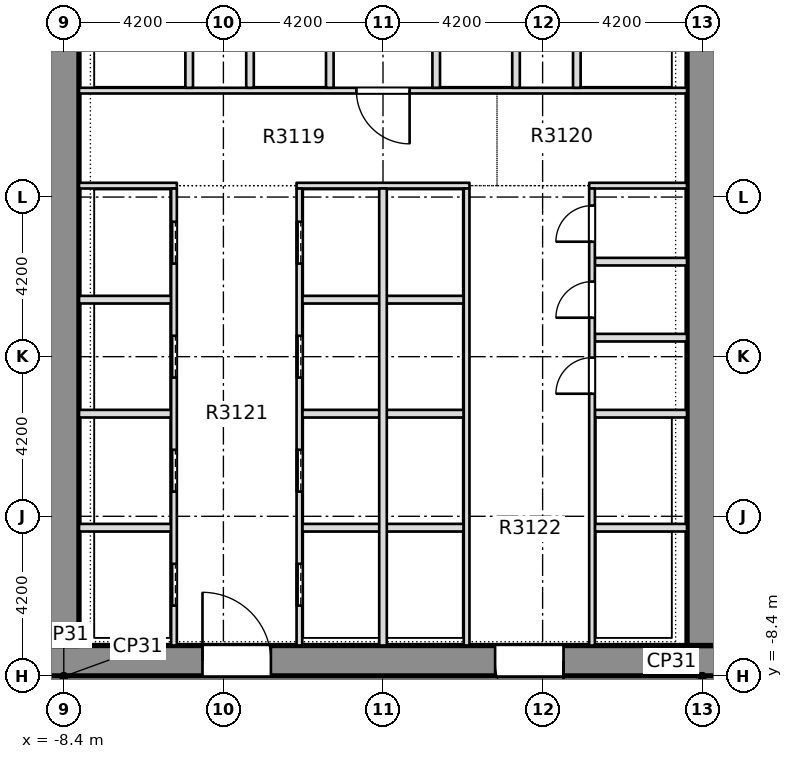
"""IFC4 building model, lengths in metres.
Left out: names, types, materials, properties, quantities, classifications, styles, units other than length and angle.
Written with IfcOpenShell. Run it as: python <this file> out.ifc"""

import sys

from ifc_helpers import new_model, si_unit, direction, frame, frame_2d, origin, place, context, subcontext, project, spatial, rectangle, extrude, element, fill, save


model = new_model("IFC4")
c1 = context("Model", 3, precision=1e-05, world=origin(), true_north=direction((0.0, 1.0)))
c2 = subcontext(c1, "Body", "Model", "MODEL_VIEW")
j1 = project(units=[si_unit("LENGTHUNIT", "METRE"), si_unit("PLANEANGLEUNIT", "RADIAN")], contexts=[c1])
p1 = place(None, origin())
s1 = spatial("IfcSite", under=j1, at=p1, CompositionType="ELEMENT")
p2 = place(p1, origin())
s2 = spatial("IfcBuilding", under=s1, at=p2, CompositionType="ELEMENT")
p3 = place(p2, frame((0.0, 0.0, 121.8)))
s3 = spatial("IfcBuildingStorey", under=s2, at=p3, CompositionType="ELEMENT", Elevation=121.8)
p4 = place(p3, frame((-11.8, -8.0, 0.0), z_axis=(0.0, 0.0, 1.0), x_axis=(1.0, 0.0, 0.0)))
e1 = element("IfcWall", 1, at=p4, inside=s3, PredefinedType="SHEAR", context=c2, shape_type="SweptSolid", body=[
    extrude(rectangle(XDim=23.6, YDim=0.8, at=frame_2d((11.8, 0.0))), origin(), (0.0, 0.0, 1.0), 6.1),
])
p5 = place(p4, frame((7.05, 0.0, 0.0)))
e2 = element("IfcOpeningElement", 2, at=p5, cuts=e1, PredefinedType="OPENING", context=c2, shape_type="SweptSolid", body=[
    extrude(rectangle(XDim=1.8, YDim=2.1, at=frame_2d((0.9, 1.05))), frame((0.0, 0.41, 0.0), z_axis=(0.0, -1.0, 0.0), x_axis=(1.0, 0.0, 0.0)), (0.0, 0.0, 1.0), 0.82),
])
p6 = place(p4, frame((14.75, 0.0, 0.0)))
e3 = element("IfcOpeningElement", 3, at=p6, cuts=e1, PredefinedType="OPENING", context=c2, shape_type="SweptSolid", body=[
    extrude(rectangle(XDim=1.8, YDim=2.1, at=frame_2d((0.9, 1.05))), frame((0.0, 0.41, 0.0), z_axis=(0.0, -1.0, 0.0), x_axis=(1.0, 0.0, 0.0)), (0.0, 0.0, 1.0), 0.82),
])
p7 = place(p3, frame((-8.4, -7.6, 0.0), z_axis=(0.0, 0.0, 1.0), x_axis=(0.0, 1.0, 0.0)))
e4 = element("IfcWall", 4, at=p7, inside=s3, PredefinedType="SHEAR", context=c2, shape_type="SweptSolid", body=[
    extrude(rectangle(XDim=28.55, YDim=0.8, at=frame_2d((14.275, 0.0))), origin(), (0.0, 0.0, 1.0), 6.1),
])
p8 = place(p7, frame((19.2, 0.0, 0.0)))
e5 = element("IfcOpeningElement", 5, at=p8, cuts=e4, PredefinedType="OPENING", context=c2, shape_type="SweptSolid", body=[
    extrude(rectangle(XDim=1.2, YDim=2.1, at=frame_2d((0.6, 1.05))), frame((0.0, 0.41, 0.0), z_axis=(0.0, -1.0, 0.0), x_axis=(1.0, 0.0, 0.0)), (0.0, 0.0, 1.0), 0.82),
])
p9 = place(p3, frame((8.4, -7.6, 0.0), z_axis=(0.0, 0.0, 1.0), x_axis=(0.0, 1.0, 0.0)))
e6 = element("IfcWall", 6, at=p9, inside=s3, PredefinedType="SHEAR", context=c2, shape_type="SweptSolid", body=[
    extrude(rectangle(XDim=28.55, YDim=0.8, at=frame_2d((14.275, 0.0))), origin(), (0.0, 0.0, 1.0), 6.1),
])
p10 = place(p9, frame((19.2, 0.0, 0.0)))
e7 = element("IfcOpeningElement", 7, at=p10, cuts=e6, PredefinedType="OPENING", context=c2, shape_type="SweptSolid", body=[
    extrude(rectangle(XDim=1.2, YDim=2.1, at=frame_2d((0.6, 1.05))), frame((0.0, 0.41, 0.0), z_axis=(0.0, -1.0, 0.0), x_axis=(1.0, 0.0, 0.0)), (0.0, 0.0, 1.0), 0.82),
])
p11 = place(p3, frame((-7.999, -4.5, 0.0), z_axis=(0.0, 0.0, 1.0), x_axis=(1.0, 0.0, 0.0)))
e8 = element("IfcWall", 8, at=p11, inside=s3, PredefinedType="PARTITIONING", context=c2, shape_type="SweptSolid", body=[
    extrude(rectangle(XDim=2.424, YDim=0.2, at=frame_2d((1.212, 0.0))), origin(), (0.0, 0.0, 1.0), 6.1),
])
p12 = place(p3, frame((-2.125, -4.5, 0.0), z_axis=(0.0, 0.0, 1.0), x_axis=(1.0, 0.0, 0.0)))
e9 = element("IfcWall", 9, at=p12, inside=s3, PredefinedType="PARTITIONING", context=c2, shape_type="SweptSolid", body=[
    extrude(rectangle(XDim=4.25, YDim=0.2, at=frame_2d((2.125, 0.0))), origin(), (0.0, 0.0, 1.0), 6.1),
])
for number, where, z_axis, x_axis in (
    (10, (5.575, -4.5, 0.0), (0.0, 0.0, 1.0), (1.0, 0.0, 0.0)),
    (11, (-7.999, -1.5, 0.0), (0.0, 0.0, 1.0), (1.0, 0.0, 0.0)),
):
    element("IfcWall", number, at=place(p3, frame(where, z_axis=z_axis, x_axis=x_axis)), inside=s3, PredefinedType="PARTITIONING", context=c2, shape_type="SweptSolid", body=[
        extrude(rectangle(XDim=2.424, YDim=0.2, at=frame_2d((1.212, 0.0))), origin(), (0.0, 0.0, 1.0), 6.1),
    ])
p13 = place(p3, frame((-2.125, -1.5, 0.0), z_axis=(0.0, 0.0, 1.0), x_axis=(1.0, 0.0, 0.0)))
e12 = element("IfcWall", 12, at=p13, inside=s3, PredefinedType="PARTITIONING", context=c2, shape_type="SweptSolid", body=[
    extrude(rectangle(XDim=4.25, YDim=0.2, at=frame_2d((2.125, 0.0))), origin(), (0.0, 0.0, 1.0), 6.1),
])
for number, where, z_axis, x_axis in (
    (13, (5.575, -1.5, 0.0), (0.0, 0.0, 1.0), (1.0, 0.0, 0.0)),
    (14, (5.575, 0.5, 0.0), (0.0, 0.0, 1.0), (1.0, 0.0, 0.0)),
    (15, (-7.999, 1.5, 0.0), (0.0, 0.0, 1.0), (1.0, 0.0, 0.0)),
):
    element("IfcWall", number, at=place(p3, frame(where, z_axis=z_axis, x_axis=x_axis)), inside=s3, PredefinedType="PARTITIONING", context=c2, shape_type="SweptSolid", body=[
        extrude(rectangle(XDim=2.424, YDim=0.2, at=frame_2d((1.212, 0.0))), origin(), (0.0, 0.0, 1.0), 6.1),
    ])
p14 = place(p3, frame((-2.125, 1.5, 0.0), z_axis=(0.0, 0.0, 1.0), x_axis=(1.0, 0.0, 0.0)))
e16 = element("IfcWall", 16, at=p14, inside=s3, PredefinedType="PARTITIONING", context=c2, shape_type="SweptSolid", body=[
    extrude(rectangle(XDim=4.25, YDim=0.2, at=frame_2d((2.125, 0.0))), origin(), (0.0, 0.0, 1.0), 6.1),
])
p15 = place(p3, frame((5.575, 2.5, 0.0), z_axis=(0.0, 0.0, 1.0), x_axis=(1.0, 0.0, 0.0)))
e17 = element("IfcWall", 17, at=p15, inside=s3, PredefinedType="PARTITIONING", context=c2, shape_type="SweptSolid", body=[
    extrude(rectangle(XDim=2.424, YDim=0.2, at=frame_2d((1.212, 0.0))), origin(), (0.0, 0.0, 1.0), 6.1),
])
p16 = place(p3, frame((-7.999, 4.5, 0.0), z_axis=(0.0, 0.0, 1.0), x_axis=(1.0, 0.0, 0.0)))
e18 = element("IfcWall", 18, at=p16, inside=s3, PredefinedType="PARTITIONING", context=c2, shape_type="SweptSolid", body=[
    extrude(rectangle(XDim=2.574, YDim=0.15, at=frame_2d((1.287, 0.0))), origin(), (0.0, 0.0, 1.0), 6.1),
])
p17 = place(p3, frame((-2.275, 4.5, 0.0), z_axis=(0.0, 0.0, 1.0), x_axis=(1.0, 0.0, 0.0)))
e19 = element("IfcWall", 19, at=p17, inside=s3, PredefinedType="PARTITIONING", context=c2, shape_type="SweptSolid", body=[
    extrude(rectangle(XDim=4.55, YDim=0.15, at=frame_2d((2.275, 0.0))), origin(), (0.0, 0.0, 1.0), 6.1),
])
p18 = place(p3, frame((5.425, 4.5, 0.0), z_axis=(0.0, 0.0, 1.0), x_axis=(1.0, 0.0, 0.0)))
e20 = element("IfcWall", 20, at=p18, inside=s3, PredefinedType="PARTITIONING", context=c2, shape_type="SweptSolid", body=[
    extrude(rectangle(XDim=2.574, YDim=0.15, at=frame_2d((1.287, 0.0))), origin(), (0.0, 0.0, 1.0), 6.1),
])
p19 = place(p3, frame((-7.999, 7.0, 0.0), z_axis=(0.0, 0.0, 1.0), x_axis=(1.0, 0.0, 0.0)))
e21 = element("IfcWall", 21, at=p19, inside=s3, PredefinedType="PARTITIONING", context=c2, shape_type="SweptSolid", body=[
    extrude(rectangle(XDim=15.998, YDim=0.15, at=frame_2d((7.999, 0.0))), origin(), (0.0, 0.0, 1.0), 6.1),
])
p20 = place(p19, frame((7.299, 0.0, 0.0)))
e22 = element("IfcOpeningElement", 22, at=p20, cuts=e21, PredefinedType="OPENING", context=c2, shape_type="SweptSolid", body=[
    extrude(rectangle(XDim=1.4, YDim=2.1, at=frame_2d((0.7, 1.05))), frame((0.0, 0.085, 0.0), z_axis=(0.0, -1.0, 0.0), x_axis=(1.0, 0.0, 0.0)), (0.0, 0.0, 1.0), 0.17),
])
p21 = place(p3, frame((-5.5, -7.599, 0.0), z_axis=(0.0, 0.0, 1.0), x_axis=(0.0, 1.0, 0.0)))
e23 = element("IfcWall", 23, at=p21, inside=s3, PredefinedType="PARTITIONING", context=c2, shape_type="SweptSolid", body=[
    extrude(rectangle(XDim=12.024, YDim=0.15, at=frame_2d((6.012, 0.0))), origin(), (0.0, 0.0, 1.0), 6.1),
])
p22 = place(p21, frame((1.049, 0.0, 0.0)))
e24 = element("IfcOpeningElement", 24, at=p22, cuts=e23, PredefinedType="OPENING", context=c2, shape_type="SweptSolid", body=[
    extrude(rectangle(XDim=1.1, YDim=2.1, at=frame_2d((0.55, 1.05))), frame((0.0, 0.085, 0.0), z_axis=(0.0, -1.0, 0.0), x_axis=(1.0, 0.0, 0.0)), (0.0, 0.0, 1.0), 0.17),
])
p23 = place(p21, frame((4.049, 0.0, 0.0)))
e25 = element("IfcOpeningElement", 25, at=p23, cuts=e23, PredefinedType="OPENING", context=c2, shape_type="SweptSolid", body=[
    extrude(rectangle(XDim=1.1, YDim=2.1, at=frame_2d((0.55, 1.05))), frame((0.0, 0.085, 0.0), z_axis=(0.0, -1.0, 0.0), x_axis=(1.0, 0.0, 0.0)), (0.0, 0.0, 1.0), 0.17),
])
p24 = place(p21, frame((7.049, 0.0, 0.0)))
e26 = element("IfcOpeningElement", 26, at=p24, cuts=e23, PredefinedType="OPENING", context=c2, shape_type="SweptSolid", body=[
    extrude(rectangle(XDim=1.1, YDim=2.1, at=frame_2d((0.55, 1.05))), frame((0.0, 0.085, 0.0), z_axis=(0.0, -1.0, 0.0), x_axis=(1.0, 0.0, 0.0)), (0.0, 0.0, 1.0), 0.17),
])
p25 = place(p21, frame((10.049, 0.0, 0.0)))
e27 = element("IfcOpeningElement", 27, at=p25, cuts=e23, PredefinedType="OPENING", context=c2, shape_type="SweptSolid", body=[
    extrude(rectangle(XDim=1.1, YDim=2.1, at=frame_2d((0.55, 1.05))), frame((0.0, 0.085, 0.0), z_axis=(0.0, -1.0, 0.0), x_axis=(1.0, 0.0, 0.0)), (0.0, 0.0, 1.0), 0.17),
])
p26 = place(p3, frame((-5.1, 7.075, 0.0), z_axis=(0.0, 0.0, 1.0), x_axis=(0.0, 1.0, 0.0)))
e28 = element("IfcWall", 28, at=p26, inside=s3, PredefinedType="PARTITIONING", context=c2, shape_type="SweptSolid", body=[
    extrude(rectangle(XDim=2.725, YDim=0.2, at=frame_2d((1.363, 0.0))), origin(), (0.0, 0.0, 1.0), 6.1),
])
p27 = place(p3, frame((-3.5, 7.075, 0.0), z_axis=(0.0, 0.0, 1.0), x_axis=(0.0, 1.0, 0.0)))
e29 = element("IfcWall", 29, at=p27, inside=s3, PredefinedType="PARTITIONING", context=c2, shape_type="SweptSolid", body=[
    extrude(rectangle(XDim=2.85, YDim=0.2, at=frame_2d((1.425, 0.0))), origin(), (0.0, 0.0, 1.0), 6.1),
])
p28 = place(p3, frame((-2.2, -7.599, 0.0), z_axis=(0.0, 0.0, 1.0), x_axis=(0.0, 1.0, 0.0)))
e30 = element("IfcWall", 30, at=p28, inside=s3, PredefinedType="PARTITIONING", context=c2, shape_type="SweptSolid", body=[
    extrude(rectangle(XDim=12.024, YDim=0.15, at=frame_2d((6.012, 0.0))), origin(), (0.0, 0.0, 1.0), 6.1),
])
p29 = place(p28, frame((1.049, 0.0, 0.0)))
e31 = element("IfcOpeningElement", 31, at=p29, cuts=e30, PredefinedType="OPENING", context=c2, shape_type="SweptSolid", body=[
    extrude(rectangle(XDim=1.1, YDim=2.1, at=frame_2d((0.55, 1.05))), frame((0.0, 0.085, 0.0), z_axis=(0.0, -1.0, 0.0), x_axis=(1.0, 0.0, 0.0)), (0.0, 0.0, 1.0), 0.17),
])
p30 = place(p28, frame((4.049, 0.0, 0.0)))
e32 = element("IfcOpeningElement", 32, at=p30, cuts=e30, PredefinedType="OPENING", context=c2, shape_type="SweptSolid", body=[
    extrude(rectangle(XDim=1.1, YDim=2.1, at=frame_2d((0.55, 1.05))), frame((0.0, 0.085, 0.0), z_axis=(0.0, -1.0, 0.0), x_axis=(1.0, 0.0, 0.0)), (0.0, 0.0, 1.0), 0.17),
])
p31 = place(p28, frame((7.049, 0.0, 0.0)))
e33 = element("IfcOpeningElement", 33, at=p31, cuts=e30, PredefinedType="OPENING", context=c2, shape_type="SweptSolid", body=[
    extrude(rectangle(XDim=1.1, YDim=2.1, at=frame_2d((0.55, 1.05))), frame((0.0, 0.085, 0.0), z_axis=(0.0, -1.0, 0.0), x_axis=(1.0, 0.0, 0.0)), (0.0, 0.0, 1.0), 0.17),
])
p32 = place(p28, frame((10.049, 0.0, 0.0)))
e34 = element("IfcOpeningElement", 34, at=p32, cuts=e30, PredefinedType="OPENING", context=c2, shape_type="SweptSolid", body=[
    extrude(rectangle(XDim=1.1, YDim=2.1, at=frame_2d((0.55, 1.05))), frame((0.0, 0.085, 0.0), z_axis=(0.0, -1.0, 0.0), x_axis=(1.0, 0.0, 0.0)), (0.0, 0.0, 1.0), 0.17),
])
p33 = place(p3, frame((-1.4, 7.075, 0.0), z_axis=(0.0, 0.0, 1.0), x_axis=(0.0, 1.0, 0.0)))
e35 = element("IfcWall", 35, at=p33, inside=s3, PredefinedType="PARTITIONING", context=c2, shape_type="SweptSolid", body=[
    extrude(rectangle(XDim=2.85, YDim=0.2, at=frame_2d((1.425, 0.0))), origin(), (0.0, 0.0, 1.0), 6.1),
])
p34 = place(p3, frame((0.0, -7.599, 0.0), z_axis=(0.0, 0.0, 1.0), x_axis=(0.0, 1.0, 0.0)))
e36 = element("IfcWall", 36, at=p34, inside=s3, PredefinedType="PARTITIONING", context=c2, shape_type="SweptSolid", body=[
    extrude(rectangle(XDim=12.024, YDim=0.2, at=frame_2d((6.012, 0.0))), origin(), (0.0, 0.0, 1.0), 6.1),
])
p35 = place(p3, frame((1.4, 7.075, 0.0), z_axis=(0.0, 0.0, 1.0), x_axis=(0.0, 1.0, 0.0)))
e37 = element("IfcWall", 37, at=p35, inside=s3, PredefinedType="PARTITIONING", context=c2, shape_type="SweptSolid", body=[
    extrude(rectangle(XDim=2.85, YDim=0.2, at=frame_2d((1.425, 0.0))), origin(), (0.0, 0.0, 1.0), 6.1),
])
p36 = place(p3, frame((2.2, -7.599, 0.0), z_axis=(0.0, 0.0, 1.0), x_axis=(0.0, 1.0, 0.0)))
e38 = element("IfcWall", 38, at=p36, inside=s3, PredefinedType="PARTITIONING", context=c2, shape_type="SweptSolid", body=[
    extrude(rectangle(XDim=12.024, YDim=0.15, at=frame_2d((6.012, 0.0))), origin(), (0.0, 0.0, 1.0), 6.1),
])
p37 = place(p3, frame((3.5, 7.075, 0.0), z_axis=(0.0, 0.0, 1.0), x_axis=(0.0, 1.0, 0.0)))
e39 = element("IfcWall", 39, at=p37, inside=s3, PredefinedType="PARTITIONING", context=c2, shape_type="SweptSolid", body=[
    extrude(rectangle(XDim=2.85, YDim=0.2, at=frame_2d((1.425, 0.0))), origin(), (0.0, 0.0, 1.0), 6.1),
])
p38 = place(p3, frame((5.1, 7.075, 0.0), z_axis=(0.0, 0.0, 1.0), x_axis=(0.0, 1.0, 0.0)))
e40 = element("IfcWall", 40, at=p38, inside=s3, PredefinedType="PARTITIONING", context=c2, shape_type="SweptSolid", body=[
    extrude(rectangle(XDim=2.725, YDim=0.2, at=frame_2d((1.363, 0.0))), origin(), (0.0, 0.0, 1.0), 6.1),
])
p39 = place(p3, frame((5.5, -7.599, 0.0), z_axis=(0.0, 0.0, 1.0), x_axis=(0.0, 1.0, 0.0)))
e41 = element("IfcWall", 41, at=p39, inside=s3, PredefinedType="PARTITIONING", context=c2, shape_type="SweptSolid", body=[
    extrude(rectangle(XDim=12.024, YDim=0.15, at=frame_2d((6.012, 0.0))), origin(), (0.0, 0.0, 1.0), 6.1),
])
p40 = place(p39, frame((6.624, 0.0, 0.0)))
e42 = element("IfcOpeningElement", 42, at=p40, cuts=e41, PredefinedType="OPENING", context=c2, shape_type="SweptSolid", body=[
    extrude(rectangle(XDim=0.95, YDim=2.1, at=frame_2d((0.475, 1.05))), frame((0.0, 0.085, 0.0), z_axis=(0.0, -1.0, 0.0), x_axis=(1.0, 0.0, 0.0)), (0.0, 0.0, 1.0), 0.17),
])
p41 = place(p39, frame((8.624, 0.0, 0.0)))
e43 = element("IfcOpeningElement", 43, at=p41, cuts=e41, PredefinedType="OPENING", context=c2, shape_type="SweptSolid", body=[
    extrude(rectangle(XDim=0.95, YDim=2.1, at=frame_2d((0.475, 1.05))), frame((0.0, 0.085, 0.0), z_axis=(0.0, -1.0, 0.0), x_axis=(1.0, 0.0, 0.0)), (0.0, 0.0, 1.0), 0.17),
])
p42 = place(p39, frame((10.624, 0.0, 0.0)))
e44 = element("IfcOpeningElement", 44, at=p42, cuts=e41, PredefinedType="OPENING", context=c2, shape_type="SweptSolid", body=[
    extrude(rectangle(XDim=0.95, YDim=2.1, at=frame_2d((0.475, 1.05))), frame((0.0, 0.085, 0.0), z_axis=(0.0, -1.0, 0.0), x_axis=(1.0, 0.0, 0.0)), (0.0, 0.0, 1.0), 0.17),
])
p43 = place(p22, origin())
e45 = element("IfcDoor", 45, at=p43, inside=s3, OperationType="SLIDING_TO_LEFT", PredefinedType="DOOR", context=c2, shape_type="SweptSolid", body=[
    extrude(rectangle(XDim=1.1, YDim=2.1, at=frame_2d((0.55, 1.05))), frame((0.0, 0.025, 0.0), z_axis=(0.0, -1.0, 0.0), x_axis=(1.0, 0.0, 0.0)), (0.0, 0.0, 1.0), 0.05),
])
fill(e24, e45)
p44 = place(p23, origin())
e46 = element("IfcDoor", 46, at=p44, inside=s3, OperationType="SLIDING_TO_LEFT", PredefinedType="DOOR", context=c2, shape_type="SweptSolid", body=[
    extrude(rectangle(XDim=1.1, YDim=2.1, at=frame_2d((0.55, 1.05))), frame((0.0, 0.025, 0.0), z_axis=(0.0, -1.0, 0.0), x_axis=(1.0, 0.0, 0.0)), (0.0, 0.0, 1.0), 0.05),
])
fill(e25, e46)
p45 = place(p24, origin())
e47 = element("IfcDoor", 47, at=p45, inside=s3, OperationType="SLIDING_TO_LEFT", PredefinedType="DOOR", context=c2, shape_type="SweptSolid", body=[
    extrude(rectangle(XDim=1.1, YDim=2.1, at=frame_2d((0.55, 1.05))), frame((0.0, 0.025, 0.0), z_axis=(0.0, -1.0, 0.0), x_axis=(1.0, 0.0, 0.0)), (0.0, 0.0, 1.0), 0.05),
])
fill(e26, e47)
p46 = place(p25, origin())
e48 = element("IfcDoor", 48, at=p46, inside=s3, OperationType="SLIDING_TO_LEFT", PredefinedType="DOOR", context=c2, shape_type="SweptSolid", body=[
    extrude(rectangle(XDim=1.1, YDim=2.1, at=frame_2d((0.55, 1.05))), frame((0.0, 0.025, 0.0), z_axis=(0.0, -1.0, 0.0), x_axis=(1.0, 0.0, 0.0)), (0.0, 0.0, 1.0), 0.05),
])
fill(e27, e48)
p47 = place(p29, origin())
e49 = element("IfcDoor", 49, at=p47, inside=s3, OperationType="SLIDING_TO_LEFT", PredefinedType="DOOR", context=c2, shape_type="SweptSolid", body=[
    extrude(rectangle(XDim=1.1, YDim=2.1, at=frame_2d((0.55, 1.05))), frame((0.0, 0.025, 0.0), z_axis=(0.0, -1.0, 0.0), x_axis=(1.0, 0.0, 0.0)), (0.0, 0.0, 1.0), 0.05),
])
fill(e31, e49)
p48 = place(p30, origin())
e50 = element("IfcDoor", 50, at=p48, inside=s3, OperationType="SLIDING_TO_LEFT", PredefinedType="DOOR", context=c2, shape_type="SweptSolid", body=[
    extrude(rectangle(XDim=1.1, YDim=2.1, at=frame_2d((0.55, 1.05))), frame((0.0, 0.025, 0.0), z_axis=(0.0, -1.0, 0.0), x_axis=(1.0, 0.0, 0.0)), (0.0, 0.0, 1.0), 0.05),
])
fill(e32, e50)
p49 = place(p31, origin())
e51 = element("IfcDoor", 51, at=p49, inside=s3, OperationType="SLIDING_TO_LEFT", PredefinedType="DOOR", context=c2, shape_type="SweptSolid", body=[
    extrude(rectangle(XDim=1.1, YDim=2.1, at=frame_2d((0.55, 1.05))), frame((0.0, 0.025, 0.0), z_axis=(0.0, -1.0, 0.0), x_axis=(1.0, 0.0, 0.0)), (0.0, 0.0, 1.0), 0.05),
])
fill(e33, e51)
p50 = place(p32, origin())
e52 = element("IfcDoor", 52, at=p50, inside=s3, OperationType="SLIDING_TO_LEFT", PredefinedType="DOOR", context=c2, shape_type="SweptSolid", body=[
    extrude(rectangle(XDim=1.1, YDim=2.1, at=frame_2d((0.55, 1.05))), frame((0.0, 0.025, 0.0), z_axis=(0.0, -1.0, 0.0), x_axis=(1.0, 0.0, 0.0)), (0.0, 0.0, 1.0), 0.05),
])
fill(e34, e52)
p51 = place(p40, origin())
e53 = element("IfcDoor", 53, at=p51, inside=s3, OperationType="SINGLE_SWING_RIGHT", PredefinedType="DOOR", context=c2, shape_type="SweptSolid", body=[
    extrude(rectangle(XDim=0.95, YDim=2.1, at=frame_2d((0.475, 1.05))), frame((0.0, 0.025, 0.0), z_axis=(0.0, -1.0, 0.0), x_axis=(1.0, 0.0, 0.0)), (0.0, 0.0, 1.0), 0.05),
])
fill(e42, e53)
p52 = place(p41, origin())
e54 = element("IfcDoor", 54, at=p52, inside=s3, OperationType="SINGLE_SWING_LEFT", PredefinedType="DOOR", context=c2, shape_type="SweptSolid", body=[
    extrude(rectangle(XDim=0.95, YDim=2.1, at=frame_2d((0.475, 1.05))), frame((0.0, 0.025, 0.0), z_axis=(0.0, -1.0, 0.0), x_axis=(1.0, 0.0, 0.0)), (0.0, 0.0, 1.0), 0.05),
])
fill(e43, e54)
p53 = place(p42, origin())
e55 = element("IfcDoor", 55, at=p53, inside=s3, OperationType="SINGLE_SWING_RIGHT", PredefinedType="DOOR", context=c2, shape_type="SweptSolid", body=[
    extrude(rectangle(XDim=0.95, YDim=2.1, at=frame_2d((0.475, 1.05))), frame((0.0, 0.025, 0.0), z_axis=(0.0, -1.0, 0.0), x_axis=(1.0, 0.0, 0.0)), (0.0, 0.0, 1.0), 0.05),
])
fill(e44, e55)
p54 = place(p20, origin())
e56 = element("IfcDoor", 56, at=p54, inside=s3, OperationType="SINGLE_SWING_RIGHT", PredefinedType="DOOR", context=c2, shape_type="SweptSolid", body=[
    extrude(rectangle(XDim=1.4, YDim=2.1, at=frame_2d((0.7, 1.05))), frame((0.0, 0.025, 0.0), z_axis=(0.0, -1.0, 0.0), x_axis=(1.0, 0.0, 0.0)), (0.0, 0.0, 1.0), 0.05),
])
fill(e22, e56)
p55 = place(p5, origin())
e57 = element("IfcDoor", 57, at=p55, inside=s3, OperationType="SINGLE_SWING_LEFT", PredefinedType="DOOR", context=c2, shape_type="SweptSolid", body=[
    extrude(rectangle(XDim=1.8, YDim=2.1, at=frame_2d((0.9, 1.05))), frame((0.0, 0.025, 0.0), z_axis=(0.0, -1.0, 0.0), x_axis=(1.0, 0.0, 0.0)), (0.0, 0.0, 1.0), 0.05),
])
fill(e2, e57)
p56 = place(p6, origin())
e58 = element("IfcDoor", 58, at=p56, inside=s3, OperationType="SINGLE_SWING_LEFT", PredefinedType="DOOR", context=c2, shape_type="SweptSolid", body=[
    extrude(rectangle(XDim=1.8, YDim=2.1, at=frame_2d((0.9, 1.05))), frame((0.0, 0.025, 0.0), z_axis=(0.0, -1.0, 0.0), x_axis=(1.0, 0.0, 0.0)), (0.0, 0.0, 1.0), 0.05),
])
fill(e3, e58)
save(model, sys.argv[1])
